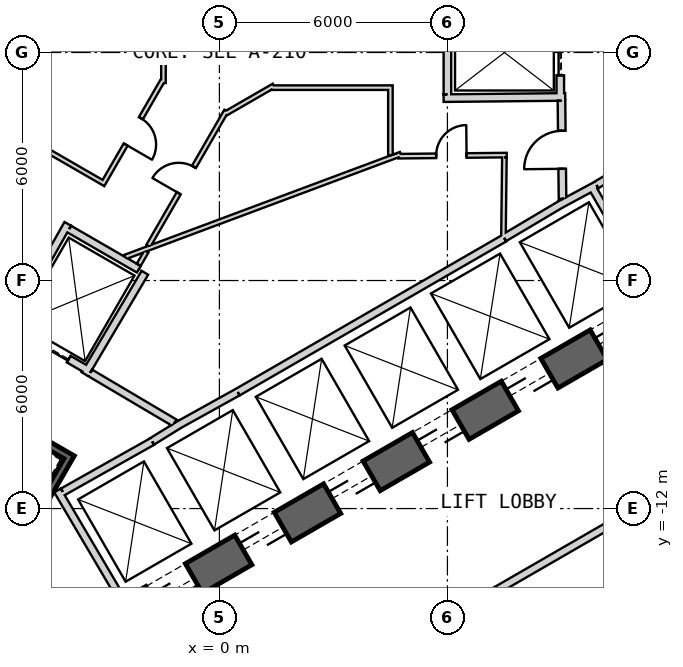
"""IFC4 building model, lengths in metres.
Left out: names, types, materials, properties, quantities, classifications, styles, units other than length and angle.
Written with IfcOpenShell. Run it as: python <this file> out.ifc"""

import sys

from ifc_helpers import new_model, si_unit, direction, frame, frame_2d, origin, place, context, subcontext, project, spatial, rectangle, extrude, element, fill, save


model = new_model("IFC4")
c1 = context("Model", 3, precision=1e-05, world=origin(), true_north=direction((0.0, 1.0)))
c2 = subcontext(c1, "Body", "Model", "MODEL_VIEW")
j1 = project(units=[si_unit("LENGTHUNIT", "METRE"), si_unit("PLANEANGLEUNIT", "RADIAN")], contexts=[c1])
p1 = place(None, origin())
s1 = spatial("IfcSite", under=j1, at=p1, CompositionType="ELEMENT")
p2 = place(p1, origin())
s2 = spatial("IfcBuilding", under=s1, at=p2, CompositionType="ELEMENT")
p3 = place(p2, frame((0.0, 0.0, 45.5)))
s3 = spatial("IfcBuildingStorey", under=s2, at=p3, CompositionType="ELEMENT", Elevation=45.5)
p4 = place(p3, frame((-7.825, -17.97, 0.0), z_axis=(0.0, 0.0, 1.0), x_axis=(0.866028369851, 0.499994862586, 0.0)))
e1 = element("IfcWall", 1, at=p4, inside=s3, PredefinedType="SHEAR", context=c2, shape_type="SweptSolid", body=[
    extrude(rectangle(XDim=31.523, YDim=0.9, at=frame_2d((15.762, 0.0))), origin(), (0.0, 0.0, 1.0), 4.1),
])
p5 = place(p4, frame((7.062, 0.0, 0.0)))
e2 = element("IfcOpeningElement", 2, at=p5, cuts=e1, PredefinedType="OPENING", context=c2, shape_type="SweptSolid", body=[
    extrude(rectangle(XDim=1.2, YDim=2.4, at=frame_2d((0.6, 1.2))), frame((0.0, 0.46, 0.0), z_axis=(0.0, -1.0, 0.0), x_axis=(1.0, 0.0, 0.0)), (0.0, 0.0, 1.0), 0.92),
])
p6 = place(p4, frame((9.762, 0.0, 0.0)))
e3 = element("IfcOpeningElement", 3, at=p6, cuts=e1, PredefinedType="OPENING", context=c2, shape_type="SweptSolid", body=[
    extrude(rectangle(XDim=1.2, YDim=2.4, at=frame_2d((0.6, 1.2))), frame((0.0, 0.46, 0.0), z_axis=(0.0, -1.0, 0.0), x_axis=(1.0, 0.0, 0.0)), (0.0, 0.0, 1.0), 0.92),
])
p7 = place(p4, frame((12.462, 0.0, 0.0)))
e4 = element("IfcOpeningElement", 4, at=p7, cuts=e1, PredefinedType="OPENING", context=c2, shape_type="SweptSolid", body=[
    extrude(rectangle(XDim=1.2, YDim=2.4, at=frame_2d((0.6, 1.2))), frame((0.0, 0.46, 0.0), z_axis=(0.0, -1.0, 0.0), x_axis=(1.0, 0.0, 0.0)), (0.0, 0.0, 1.0), 0.92),
])
p8 = place(p4, frame((15.162, 0.0, 0.0)))
e5 = element("IfcOpeningElement", 5, at=p8, cuts=e1, PredefinedType="OPENING", context=c2, shape_type="SweptSolid", body=[
    extrude(rectangle(XDim=1.2, YDim=2.4, at=frame_2d((0.6, 1.2))), frame((0.0, 0.46, 0.0), z_axis=(0.0, -1.0, 0.0), x_axis=(1.0, 0.0, 0.0)), (0.0, 0.0, 1.0), 0.92),
])
p9 = place(p4, frame((17.862, 0.0, 0.0)))
e6 = element("IfcOpeningElement", 6, at=p9, cuts=e1, PredefinedType="OPENING", context=c2, shape_type="SweptSolid", body=[
    extrude(rectangle(XDim=1.2, YDim=2.4, at=frame_2d((0.6, 1.2))), frame((0.0, 0.46, 0.0), z_axis=(0.0, -1.0, 0.0), x_axis=(1.0, 0.0, 0.0)), (0.0, 0.0, 1.0), 0.92),
])
p10 = place(p4, frame((20.562, 0.0, 0.0)))
e7 = element("IfcOpeningElement", 7, at=p10, cuts=e1, PredefinedType="OPENING", context=c2, shape_type="SweptSolid", body=[
    extrude(rectangle(XDim=1.2, YDim=2.4, at=frame_2d((0.6, 1.2))), frame((0.0, 0.46, 0.0), z_axis=(0.0, -1.0, 0.0), x_axis=(1.0, 0.0, 0.0)), (0.0, 0.0, 1.0), 0.92),
])
p11 = place(p4, frame((26.712, 0.0, 0.0)))
e8 = element("IfcOpeningElement", 8, at=p11, cuts=e1, PredefinedType="OPENING", context=c2, shape_type="SweptSolid", body=[
    extrude(rectangle(XDim=1.2, YDim=2.4, at=frame_2d((0.6, 1.2))), frame((0.0, 0.46, 0.0), z_axis=(0.0, -1.0, 0.0), x_axis=(1.0, 0.0, 0.0)), (0.0, 0.0, 1.0), 0.92),
])
p12 = place(p4, frame((3.612, 0.0, 0.0)))
e9 = element("IfcOpeningElement", 9, at=p12, cuts=e1, PredefinedType="OPENING", context=c2, shape_type="SweptSolid", body=[
    extrude(rectangle(XDim=1.2, YDim=2.4, at=frame_2d((0.6, 1.2))), frame((0.0, 0.46, 0.0), z_axis=(0.0, -1.0, 0.0), x_axis=(1.0, 0.0, 0.0)), (0.0, 0.0, 1.0), 0.92),
])
p13 = place(p3, frame((0.483, -8.936, 0.0), z_axis=(0.0, 0.0, 1.0), x_axis=(0.866030989016, 0.499990325971, 0.0)))
e10 = element("IfcWall", 10, at=p13, inside=s3, PredefinedType="PLUMBINGWALL", context=c2, shape_type="SweptSolid", body=[
    extrude(rectangle(XDim=8.1, YDim=0.2, at=frame_2d((4.05, 0.0))), origin(), (0.0, 0.0, 1.0), 3.8),
])
p14 = place(p3, frame((9.795, -3.525, 0.0), z_axis=(0.0, 0.0, 1.0), x_axis=(0.499984717929, -0.866034226713, 0.0)))
e11 = element("IfcWall", 11, at=p14, inside=s3, PredefinedType="PLUMBINGWALL", context=c2, shape_type="SweptSolid", body=[
    extrude(rectangle(XDim=3.25, YDim=0.2, at=frame_2d((1.625, 0.0))), origin(), (0.0, 0.0, 1.0), 3.8),
])
p15 = place(p3, frame((8.974, -3.999, 0.0), z_axis=(0.0, 0.0, 1.0), x_axis=(0.880907015104, 0.473289373154, 0.0)))
e12 = element("IfcWall", 12, at=p15, inside=s3, PredefinedType="PLUMBINGWALL", context=c2, shape_type="SweptSolid", body=[
    extrude(rectangle(XDim=1.078, YDim=0.2, at=frame_2d((0.539, 0.0))), origin(), (0.0, 0.0, 1.0), 3.8),
])
p16 = place(p3, frame((7.493, -4.878, 0.0), z_axis=(0.0, 0.0, 1.0), x_axis=(0.859981807212, 0.510324691999, 0.0)))
e13 = element("IfcWall", 13, at=p16, inside=s3, PredefinedType="PLUMBINGWALL", context=c2, shape_type="SweptSolid", body=[
    extrude(rectangle(XDim=1.845, YDim=0.2, at=frame_2d((0.922, 0.0))), origin(), (0.0, 0.0, 1.0), 3.8),
])
p17 = place(p3, frame((-2.558, -14.409, 0.0), z_axis=(0.0, 0.0, 1.0), x_axis=(-0.507997497166, 0.861358544901, 0.0)))
e14 = element("IfcWall", 14, at=p17, inside=s3, PredefinedType="PLUMBINGWALL", context=c2, shape_type="SweptSolid", body=[
    extrude(rectangle(XDim=3.35, YDim=0.2, at=frame_2d((1.675, 0.0))), origin(), (0.0, 0.0, 1.0), 3.8),
])
p18 = place(p3, frame((-1.769, -10.237, 0.0), z_axis=(0.0, 0.0, 1.0), x_axis=(-0.871534483978, -0.490334215854, 0.0)))
e15 = element("IfcWall", 15, at=p18, inside=s3, PredefinedType="PLUMBINGWALL", context=c2, shape_type="SweptSolid", body=[
    extrude(rectangle(XDim=2.7, YDim=0.2, at=frame_2d((1.35, 0.0))), origin(), (0.0, 0.0, 1.0), 3.8),
])
p19 = place(p3, frame((-1.024, -9.771, 0.0), z_axis=(0.0, 0.0, 1.0), x_axis=(-0.850348075135, -0.526220629693, 0.0)))
e16 = element("IfcWall", 16, at=p19, inside=s3, PredefinedType="PLUMBINGWALL", context=c2, shape_type="SweptSolid", body=[
    extrude(rectangle(XDim=0.878, YDim=0.2, at=frame_2d((0.439, 0.0))), origin(), (0.0, 0.0, 1.0), 3.8),
])
p20 = place(p3, frame((-1.13, -9.831, 0.0), z_axis=(0.0, 0.0, 1.0), x_axis=(0.874269620932, 0.485440655401, 0.0)))
e17 = element("IfcWall", 17, at=p20, inside=s3, PredefinedType="PLUMBINGWALL", context=c2, shape_type="SweptSolid", body=[
    extrude(rectangle(XDim=1.845, YDim=0.2, at=frame_2d((0.922, 0.0))), origin(), (0.0, 0.0, 1.0), 3.8),
])
p21 = place(p3, frame((8.97, 1.2, 0.0), z_axis=(0.0, 0.0, 1.0), x_axis=(0.0, -1.0, 0.0)))
e18 = element("IfcWall", 18, at=p21, inside=s3, PredefinedType="PLUMBINGWALL", context=c2, shape_type="SweptSolid", body=[
    extrude(rectangle(XDim=2.4, YDim=0.2, at=frame_2d((1.2, 0.0))), origin(), (0.0, 0.0, 1.0), 3.8),
])
p22 = place(p21, frame((0.6, 0.0, 0.0)))
e19 = element("IfcOpeningElement", 19, at=p22, cuts=e18, PredefinedType="OPENING", context=c2, shape_type="SweptSolid", body=[
    extrude(rectangle(XDim=1.2, YDim=2.4, at=frame_2d((0.6, 1.2))), frame((0.0, 0.11, 0.0), z_axis=(0.0, -1.0, 0.0), x_axis=(1.0, 0.0, 0.0)), (0.0, 0.0, 1.0), 0.22),
])
p23 = place(p3, frame((5.9, -1.201, 0.0), z_axis=(0.0, 0.0, 1.0), x_axis=(0.999950064753, 0.009993397809, 0.0)))
e20 = element("IfcWall", 20, at=p23, inside=s3, PredefinedType="PLUMBINGWALL", context=c2, shape_type="SweptSolid", body=[
    extrude(rectangle(XDim=3.2, YDim=0.2, at=frame_2d((1.6, 0.0))), origin(), (0.0, 0.0, 1.0), 3.8),
])
p24 = place(p3, frame((6.0, -1.1, 0.0), z_axis=(0.0, 0.0, 1.0), x_axis=(0.0, 1.0, 0.0)))
e21 = element("IfcWall", 21, at=p24, inside=s3, PredefinedType="PLUMBINGWALL", context=c2, shape_type="SweptSolid", body=[
    extrude(rectangle(XDim=2.13, YDim=0.2, at=frame_2d((1.065, 0.0))), origin(), (0.0, 0.0, 1.0), 3.8),
])
p25 = place(p3, frame((-3.905, -10.563, -0.3), z_axis=(0.0, 0.0, 1.0), x_axis=(-0.500012932018, -0.866017937352, 0.0)))
e22 = element("IfcWall", 22, at=p25, inside=s3, PredefinedType="SHEAR", context=c2, shape_type="SweptSolid", body=[
    extrude(rectangle(XDim=8.1, YDim=0.2, at=frame_2d((4.05, 0.0))), origin(), (0.0, 0.0, 1.0), 4.1),
])
p26 = place(p3, frame((-4.041, -10.599, -0.3), z_axis=(0.0, 0.0, 1.0), x_axis=(-0.866047807691, 0.499961193289, 0.0)))
e23 = element("IfcWall", 23, at=p26, inside=s3, PredefinedType="SHEAR", context=c2, shape_type="SweptSolid", body=[
    extrude(rectangle(XDim=3.6, YDim=0.2, at=frame_2d((1.8, 0.0))), origin(), (0.0, 0.0, 1.0), 4.1),
])
p27 = place(p26, frame((1.25, 0.0, 0.3)))
e24 = element("IfcOpeningElement", 24, at=p27, cuts=e23, PredefinedType="OPENING", context=c2, shape_type="SweptSolid", body=[
    extrude(rectangle(XDim=1.1, YDim=2.1, at=frame_2d((0.55, 1.05))), frame((0.0, 0.11, 0.0), z_axis=(0.0, -1.0, 0.0), x_axis=(1.0, 0.0, 0.0)), (0.0, 0.0, 1.0), 0.22),
])
p28 = place(p3, frame((-3.446, -8.368, 0.0), z_axis=(0.0, 0.0, 1.0), x_axis=(-0.866024647952, 0.500001309137, 0.0)))
e25 = element("IfcWall", 25, at=p28, inside=s3, PredefinedType="PLUMBINGWALL", context=c2, shape_type="SweptSolid", body=[
    extrude(rectangle(XDim=2.4, YDim=0.2, at=frame_2d((1.2, 0.0))), origin(), (0.0, 0.0, 1.0), 3.8),
])
p29 = place(p28, frame((0.6, 0.0, 0.0)))
e26 = element("IfcOpeningElement", 26, at=p29, cuts=e25, PredefinedType="OPENING", context=c2, shape_type="SweptSolid", body=[
    extrude(rectangle(XDim=1.2, YDim=2.4, at=frame_2d((0.6, 1.2))), frame((0.0, 0.11, 0.0), z_axis=(0.0, -1.0, 0.0), x_axis=(1.0, 0.0, 0.0)), (0.0, 0.0, 1.0), 0.22),
])
p30 = place(p3, frame((-1.961, -5.796, 0.0), z_axis=(0.0, 0.0, 1.0), x_axis=(-0.508647062354, -0.860975125052, 0.0)))
e27 = element("IfcWall", 27, at=p30, inside=s3, PredefinedType="PLUMBINGWALL", context=c2, shape_type="SweptSolid", body=[
    extrude(rectangle(XDim=3.1, YDim=0.2, at=frame_2d((1.55, 0.0))), origin(), (0.0, 0.0, 1.0), 3.8),
])
p31 = place(p3, frame((-3.99, -4.509, 0.0), z_axis=(0.0, 0.0, 1.0), x_axis=(-0.491358283181, -0.870957540612, 0.0)))
e28 = element("IfcWall", 28, at=p31, inside=s3, PredefinedType="PLUMBINGWALL", context=c2, shape_type="SweptSolid", body=[
    extrude(rectangle(XDim=3.2, YDim=0.2, at=frame_2d((1.6, 0.0))), origin(), (0.0, 0.0, 1.0), 3.8),
])
p32 = place(p3, frame((-3.953, -4.646, 0.0), z_axis=(0.0, 0.0, 1.0), x_axis=(0.866060616833, -0.499939004251, 0.0)))
e29 = element("IfcWall", 29, at=p32, inside=s3, PredefinedType="PLUMBINGWALL", context=c2, shape_type="SweptSolid", body=[
    extrude(rectangle(XDim=2.115, YDim=0.2, at=frame_2d((1.057, 0.0))), origin(), (0.0, 0.0, 1.0), 3.8),
])
p33 = place(p3, frame((12.245, -2.109, 0.0), z_axis=(0.0, 0.0, 1.0), x_axis=(-0.860414880418, -0.509594185166, 0.0)))
e30 = element("IfcWall", 30, at=p33, inside=s3, PredefinedType="PARTITIONING", context=c2, shape_type="SweptSolid", body=[
    extrude(rectangle(XDim=2.7, YDim=0.2, at=frame_2d((1.35, 0.0))), origin(), (0.0, 0.0, 1.0), 3.8),
])
p34 = place(p3, frame((9.029, -3.851, 0.0), z_axis=(0.0, 0.0, 1.0), x_axis=(-0.010783593937, 0.99994185536, 0.0)))
e31 = element("IfcWall", 31, at=p34, inside=s3, PredefinedType="PARTITIONING", context=c2, shape_type="SweptSolid", body=[
    extrude(rectangle(XDim=2.581, YDim=0.2, at=frame_2d((1.291, 0.0))), origin(), (0.0, 0.0, 1.0), 3.8),
])
p35 = place(p34, frame((0.791, 0.0, 0.0)))
e32 = element("IfcOpeningElement", 32, at=p35, cuts=e31, PredefinedType="OPENING", context=c2, shape_type="SweptSolid", body=[
    extrude(rectangle(XDim=1.0, YDim=2.1, at=frame_2d((0.5, 1.05))), frame((0.0, 0.11, 0.0), z_axis=(0.0, -1.0, 0.0), x_axis=(1.0, 0.0, 0.0)), (0.0, 0.0, 1.0), 0.22),
])
p36 = place(p3, frame((-3.401, -8.43, 0.0), z_axis=(0.0, 0.0, 1.0), x_axis=(0.860615607571, -0.509255118781, 0.0)))
e33 = element("IfcWall", 33, at=p36, inside=s3, PredefinedType="PARTITIONING", context=c2, shape_type="SweptSolid", body=[
    extrude(rectangle(XDim=2.581, YDim=0.2, at=frame_2d((1.29, 0.0))), origin(), (0.0, 0.0, 1.0), 3.8),
])
p37 = place(p3, frame((4.769, -2.673, 0.0), z_axis=(0.0, 0.0, 1.0), x_axis=(-0.936819599564, -0.349812861217, 0.0)))
e34 = element("IfcWall", 34, at=p37, inside=s3, PredefinedType="PARTITIONING", context=c2, shape_type="SweptSolid", body=[
    extrude(rectangle(XDim=7.739, YDim=0.12, at=frame_2d((3.87, 0.0))), origin(), (0.0, 0.0, 1.0), 3.8),
])
p38 = place(p3, frame((0.182, -1.535, 0.0), z_axis=(0.0, 0.0, 1.0), x_axis=(-0.499966268063, -0.866044878051, 0.0)))
e35 = element("IfcWall", 35, at=p38, inside=s3, PredefinedType="PARTITIONING", context=c2, shape_type="SweptSolid", body=[
    extrude(rectangle(XDim=4.103, YDim=0.12, at=frame_2d((2.051, 0.0))), origin(), (0.0, 0.0, 1.0), 3.8),
])
p39 = place(p38, frame((1.703, 0.0, 0.0)))
e36 = element("IfcOpeningElement", 36, at=p39, cuts=e35, PredefinedType="OPENING", context=c2, shape_type="SweptSolid", body=[
    extrude(rectangle(XDim=0.8, YDim=2.1, at=frame_2d((0.4, 1.05))), frame((0.0, 0.07, 0.0), z_axis=(0.0, -1.0, 0.0), x_axis=(1.0, 0.0, 0.0)), (0.0, 0.0, 1.0), 0.14),
])
p40 = place(p3, frame((1.432, -0.873, 0.0), z_axis=(0.0, 0.0, 1.0), x_axis=(-0.866029572143, -0.499992780121, 0.0)))
e37 = element("IfcWall", 37, at=p40, inside=s3, PredefinedType="PARTITIONING", context=c2, shape_type="SweptSolid", body=[
    extrude(rectangle(XDim=1.485, YDim=0.12, at=frame_2d((0.743, 0.0))), origin(), (0.0, 0.0, 1.0), 3.8),
])
p41 = place(p3, frame((4.56, -0.925, 0.0), z_axis=(0.0, 0.0, 1.0), x_axis=(-1.0, 0.0, 0.0)))
e38 = element("IfcWall", 38, at=p41, inside=s3, PredefinedType="PARTITIONING", context=c2, shape_type="SweptSolid", body=[
    extrude(rectangle(XDim=3.199, YDim=0.12, at=frame_2d((1.6, 0.0))), origin(), (0.0, 0.0, 1.0), 3.8),
])
p42 = place(p3, frame((4.5, -2.7, 0.0), z_axis=(0.0, 0.0, 1.0), x_axis=(0.0, 1.0, 0.0)))
e39 = element("IfcWall", 39, at=p42, inside=s3, PredefinedType="PARTITIONING", context=c2, shape_type="SweptSolid", body=[
    extrude(rectangle(XDim=1.715, YDim=0.12, at=frame_2d((0.857, 0.0))), origin(), (0.0, 0.0, 1.0), 3.8),
])
p43 = place(p3, frame((-1.92, -5.235, 0.0), z_axis=(0.0, 0.0, 1.0), x_axis=(-0.499566316511, -0.86627564632, 0.0)))
e40 = element("IfcWall", 40, at=p43, inside=s3, PredefinedType="PARTITIONING", context=c2, shape_type="SweptSolid", body=[
    extrude(rectangle(XDim=0.406, YDim=0.12, at=frame_2d((0.203, 0.0))), origin(), (0.0, 0.0, 1.0), 3.8),
])
p44 = place(p3, frame((7.56, -2.699, 0.0), z_axis=(0.0, 0.0, 1.0), x_axis=(-0.999948120507, -0.010186083405, 0.0)))
e41 = element("IfcWall", 41, at=p44, inside=s3, PredefinedType="PARTITIONING", context=c2, shape_type="SweptSolid", body=[
    extrude(rectangle(XDim=2.852, YDim=0.12, at=frame_2d((1.426, 0.0))), origin(), (0.0, 0.0, 1.0), 3.8),
])
p45 = place(p44, frame((1.056, 0.0, 0.0)))
e42 = element("IfcOpeningElement", 42, at=p45, cuts=e41, PredefinedType="OPENING", context=c2, shape_type="SweptSolid", body=[
    extrude(rectangle(XDim=0.8, YDim=2.1, at=frame_2d((0.4, 1.05))), frame((0.0, 0.07, 0.0), z_axis=(0.0, -1.0, 0.0), x_axis=(1.0, 0.0, 0.0)), (0.0, 0.0, 1.0), 0.14),
])
p46 = place(p3, frame((7.475, -4.865, 0.0), z_axis=(0.0, 0.0, 1.0), x_axis=(0.011716133148, 0.999931363757, 0.0)))
e43 = element("IfcWall", 43, at=p46, inside=s3, PredefinedType="PARTITIONING", context=c2, shape_type="SweptSolid", body=[
    extrude(rectangle(XDim=2.105, YDim=0.12, at=frame_2d((1.052, 0.0))), origin(), (0.0, 0.0, 1.0), 3.8),
])
p47 = place(p3, frame((-1.472, -0.804, 0.0), z_axis=(0.0, 0.0, 1.0), x_axis=(0.0, 1.0, 0.0)))
e44 = element("IfcWall", 44, at=p47, inside=s3, PredefinedType="PARTITIONING", context=c2, shape_type="SweptSolid", body=[
    extrude(rectangle(XDim=1.485, YDim=0.12, at=frame_2d((0.743, 0.0))), origin(), (0.0, 0.0, 1.0), 3.8),
])
p48 = place(p3, frame((-3.081, -3.487, 0.0), z_axis=(0.0, 0.0, 1.0), x_axis=(0.500013115284, 0.866017831539, 0.0)))
e45 = element("IfcWall", 45, at=p48, inside=s3, PredefinedType="PARTITIONING", context=c2, shape_type="SweptSolid", body=[
    extrude(rectangle(XDim=3.199, YDim=0.12, at=frame_2d((1.6, 0.0))), origin(), (0.0, 0.0, 1.0), 3.8),
])
p49 = place(p48, frame((1.229, 0.0, 0.0)))
e46 = element("IfcOpeningElement", 46, at=p49, cuts=e45, PredefinedType="OPENING", context=c2, shape_type="SweptSolid", body=[
    extrude(rectangle(XDim=0.8, YDim=2.1, at=frame_2d((0.4, 1.05))), frame((0.0, 0.07, 0.0), z_axis=(0.0, -1.0, 0.0), x_axis=(1.0, 0.0, 0.0)), (0.0, 0.0, 1.0), 0.14),
])
p50 = place(p3, frame((-4.925, -2.353, 0.0), z_axis=(0.0, 0.0, 1.0), x_axis=(0.86604260665, -0.49997020258, 0.0)))
e47 = element("IfcWall", 47, at=p50, inside=s3, PredefinedType="PARTITIONING", context=c2, shape_type="SweptSolid", body=[
    extrude(rectangle(XDim=2.104, YDim=0.12, at=frame_2d((1.052, 0.0))), origin(), (0.0, 0.0, 1.0), 3.8),
])
p51 = place(p3, frame((-6.436, -22.075, 0.0), z_axis=(0.0, 0.0, 1.0), x_axis=(0.866022453651, 0.500005109747, 0.0)))
e48 = element("IfcWall", 48, at=p51, inside=s3, PredefinedType="PARTITIONING", context=c2, shape_type="SweptSolid", body=[
    extrude(rectangle(XDim=33.022, YDim=0.2, at=frame_2d((16.511, 0.0))), origin(), (0.0, 0.0, 1.0), 2.98),
])
p52 = place(p51, frame((20.89, 0.0, 0.0)))
e49 = element("IfcOpeningElement", 49, at=p52, cuts=e48, PredefinedType="OPENING", context=c2, shape_type="SweptSolid", body=[
    extrude(rectangle(XDim=1.0, YDim=2.1, at=frame_2d((0.5, 1.05))), frame((0.0, 0.11, 0.0), z_axis=(0.0, -1.0, 0.0), x_axis=(1.0, 0.0, 0.0)), (0.0, 0.0, 1.0), 0.22),
])
p53 = place(p51, frame((4.429, 0.0, 0.0)))
e50 = element("IfcOpeningElement", 50, at=p53, cuts=e48, PredefinedType="OPENING", context=c2, shape_type="SweptSolid", body=[
    extrude(rectangle(XDim=1.0, YDim=2.1, at=frame_2d((0.5, 1.05))), frame((0.0, 0.11, 0.0), z_axis=(0.0, -1.0, 0.0), x_axis=(1.0, 0.0, 0.0)), (0.0, 0.0, 1.0), 0.22),
])
p54 = place(p35, origin())
e51 = element("IfcDoor", 51, at=p54, inside=s3, OperationType="SINGLE_SWING_LEFT", PredefinedType="USERDEFINED", context=c2, shape_type="SweptSolid", body=[
    extrude(rectangle(XDim=1.0, YDim=2.1, at=frame_2d((0.5, 1.05))), frame((0.0, 0.025, 0.0), z_axis=(0.0, -1.0, 0.0), x_axis=(1.0, 0.0, 0.0)), (0.0, 0.0, 1.0), 0.05),
])
fill(e32, e51)
p55 = place(p22, origin())
e52 = element("IfcDoor", 52, at=p55, inside=s3, OperationType="SLIDING_TO_LEFT", PredefinedType="USERDEFINED", context=c2, shape_type="SweptSolid", body=[
    extrude(rectangle(XDim=1.2, YDim=2.4, at=frame_2d((0.6, 1.2))), frame((0.0, 0.025, 0.0), z_axis=(0.0, -1.0, 0.0), x_axis=(1.0, 0.0, 0.0)), (0.0, 0.0, 1.0), 0.05),
])
fill(e19, e52)
p56 = place(p29, origin())
e53 = element("IfcDoor", 53, at=p56, inside=s3, OperationType="SLIDING_TO_LEFT", PredefinedType="USERDEFINED", context=c2, shape_type="SweptSolid", body=[
    extrude(rectangle(XDim=1.2, YDim=2.4, at=frame_2d((0.6, 1.2))), frame((0.0, 0.025, 0.0), z_axis=(0.0, -1.0, 0.0), x_axis=(1.0, 0.0, 0.0)), (0.0, 0.0, 1.0), 0.05),
])
fill(e26, e53)
p57 = place(p39, origin())
e54 = element("IfcDoor", 54, at=p57, inside=s3, OperationType="SINGLE_SWING_LEFT", PredefinedType="USERDEFINED", context=c2, shape_type="SweptSolid", body=[
    extrude(rectangle(XDim=0.8, YDim=2.1, at=frame_2d((0.4, 1.05))), frame((0.0, 0.025, 0.0), z_axis=(0.0, -1.0, 0.0), x_axis=(1.0, 0.0, 0.0)), (0.0, 0.0, 1.0), 0.05),
])
fill(e36, e54)
p58 = place(p45, origin())
e55 = element("IfcDoor", 55, at=p58, inside=s3, OperationType="SINGLE_SWING_RIGHT", PredefinedType="USERDEFINED", context=c2, shape_type="SweptSolid", body=[
    extrude(rectangle(XDim=0.8, YDim=2.1, at=frame_2d((0.4, 1.05))), frame((0.0, 0.025, 0.0), z_axis=(0.0, -1.0, 0.0), x_axis=(1.0, 0.0, 0.0)), (0.0, 0.0, 1.0), 0.05),
])
fill(e42, e55)
p59 = place(p49, origin())
e56 = element("IfcDoor", 56, at=p59, inside=s3, OperationType="SINGLE_SWING_LEFT", PredefinedType="USERDEFINED", context=c2, shape_type="SweptSolid", body=[
    extrude(rectangle(XDim=0.8, YDim=2.1, at=frame_2d((0.4, 1.05))), frame((0.0, 0.025, 0.0), z_axis=(0.0, -1.0, 0.0), x_axis=(1.0, 0.0, 0.0)), (0.0, 0.0, 1.0), 0.05),
])
fill(e46, e56)
p60 = place(p5, origin())
e57 = element("IfcDoor", 57, at=p60, inside=s3, OperationType="SLIDING_TO_LEFT", PredefinedType="USERDEFINED", context=c2, shape_type="SweptSolid", body=[
    extrude(rectangle(XDim=1.2, YDim=2.4, at=frame_2d((0.6, 1.2))), frame((0.0, 0.025, 0.0), z_axis=(0.0, -1.0, 0.0), x_axis=(1.0, 0.0, 0.0)), (0.0, 0.0, 1.0), 0.05),
])
fill(e2, e57)
p61 = place(p6, origin())
e58 = element("IfcDoor", 58, at=p61, inside=s3, OperationType="SLIDING_TO_LEFT", PredefinedType="USERDEFINED", context=c2, shape_type="SweptSolid", body=[
    extrude(rectangle(XDim=1.2, YDim=2.4, at=frame_2d((0.6, 1.2))), frame((0.0, 0.025, 0.0), z_axis=(0.0, -1.0, 0.0), x_axis=(1.0, 0.0, 0.0)), (0.0, 0.0, 1.0), 0.05),
])
fill(e3, e58)
p62 = place(p7, origin())
e59 = element("IfcDoor", 59, at=p62, inside=s3, OperationType="SLIDING_TO_LEFT", PredefinedType="USERDEFINED", context=c2, shape_type="SweptSolid", body=[
    extrude(rectangle(XDim=1.2, YDim=2.4, at=frame_2d((0.6, 1.2))), frame((0.0, 0.025, 0.0), z_axis=(0.0, -1.0, 0.0), x_axis=(1.0, 0.0, 0.0)), (0.0, 0.0, 1.0), 0.05),
])
fill(e4, e59)
p63 = place(p8, origin())
e60 = element("IfcDoor", 60, at=p63, inside=s3, OperationType="SLIDING_TO_LEFT", PredefinedType="USERDEFINED", context=c2, shape_type="SweptSolid", body=[
    extrude(rectangle(XDim=1.2, YDim=2.4, at=frame_2d((0.6, 1.2))), frame((0.0, 0.025, 0.0), z_axis=(0.0, -1.0, 0.0), x_axis=(1.0, 0.0, 0.0)), (0.0, 0.0, 1.0), 0.05),
])
fill(e5, e60)
p64 = place(p9, origin())
e61 = element("IfcDoor", 61, at=p64, inside=s3, OperationType="SLIDING_TO_LEFT", PredefinedType="USERDEFINED", context=c2, shape_type="SweptSolid", body=[
    extrude(rectangle(XDim=1.2, YDim=2.4, at=frame_2d((0.6, 1.2))), frame((0.0, 0.025, 0.0), z_axis=(0.0, -1.0, 0.0), x_axis=(1.0, 0.0, 0.0)), (0.0, 0.0, 1.0), 0.05),
])
fill(e6, e61)
p65 = place(p10, origin())
e62 = element("IfcDoor", 62, at=p65, inside=s3, OperationType="SLIDING_TO_LEFT", PredefinedType="USERDEFINED", context=c2, shape_type="SweptSolid", body=[
    extrude(rectangle(XDim=1.2, YDim=2.4, at=frame_2d((0.6, 1.2))), frame((0.0, 0.025, 0.0), z_axis=(0.0, -1.0, 0.0), x_axis=(1.0, 0.0, 0.0)), (0.0, 0.0, 1.0), 0.05),
])
fill(e7, e62)
save(model, sys.argv[1])
